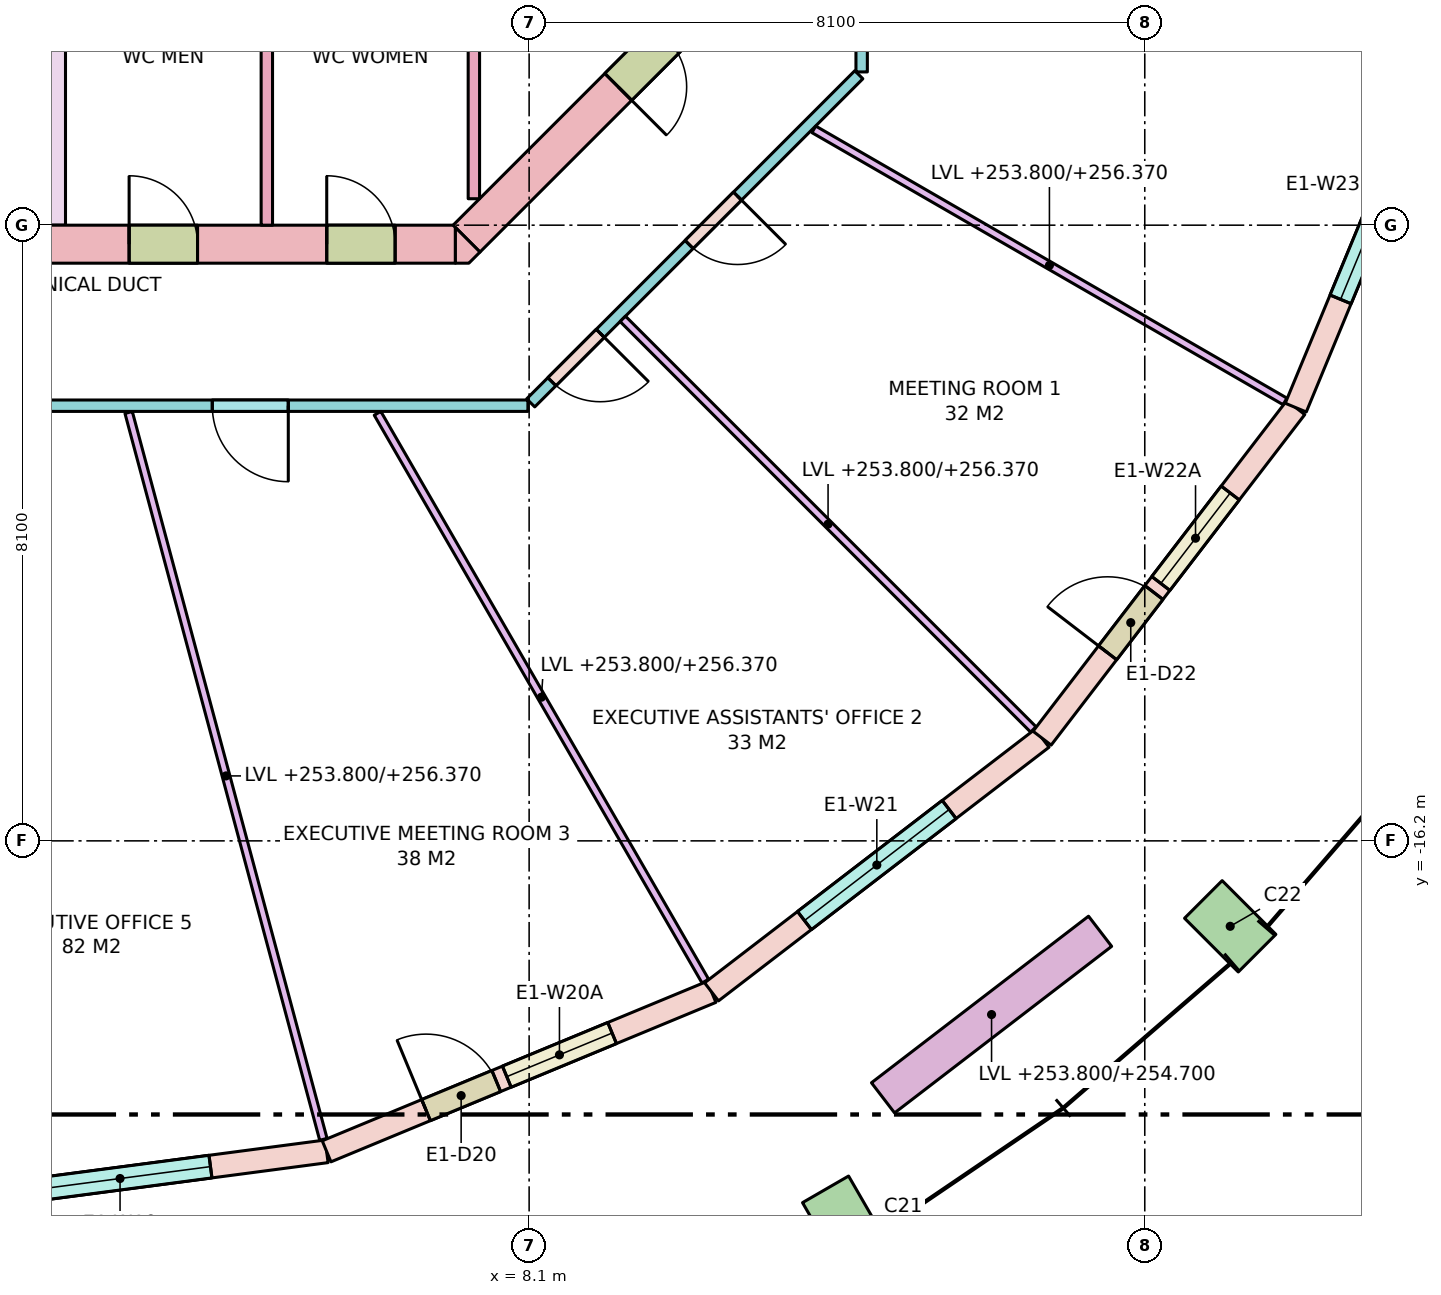
"""IFC4 building model, lengths in metres.
Left out: names, types, materials, properties, quantities, classifications, styles, units other than length and angle.
Written with IfcOpenShell. Run it as: python <this file> out.ifc"""

import sys

from ifc_helpers import new_model, si_unit, direction, frame, frame_2d, origin, origin_2d, place, context, subcontext, project, spatial, polyline, rectangle, outline, extrude, element, fill, save


model = new_model("IFC4")
c1 = context("Model", 3, precision=1e-05, world=origin(), true_north=direction((0.0, 1.0)))
c2 = subcontext(c1, "Body", "Model", "MODEL_VIEW")
j1 = project(units=[si_unit("LENGTHUNIT", "METRE"), si_unit("PLANEANGLEUNIT", "RADIAN")], contexts=[c1])
p1 = place(None, origin())
s1 = spatial("IfcSite", under=j1, at=p1, CompositionType="ELEMENT")
p2 = place(p1, origin())
s2 = spatial("IfcBuilding", under=s1, at=p2, CompositionType="ELEMENT")
p3 = place(p2, frame((0.0, 0.0, 253.8)))
s3 = spatial("IfcBuildingStorey", under=s2, at=p3, CompositionType="ELEMENT", Elevation=253.8)
for number, where, z_axis, x_axis in (
    (1, (12.25, -21.218, 0.0), (0.0, 0.0, 1.0), (0.866, 0.5, 0.0)),
    (2, (17.324, -17.324, 0.0), (0.0, 0.0, 1.0), (0.707, 0.707, 0.0)),
):
    element("IfcColumn", number, at=place(p3, frame(where, z_axis=z_axis, x_axis=x_axis)), inside=s3, PredefinedType="COLUMN", context=c2, shape_type="SweptSolid", body=[
        extrude(rectangle(XDim=0.7, YDim=1.0, at=origin_2d()), origin(), (0.0, 0.0, 1.0), 3.7),
    ])
p4 = place(p3, frame((-7.13, -8.35, -0.28), z_axis=(0.0, 0.0, 1.0), x_axis=(1.0, 0.0, 0.0)))
e3 = element("IfcWall", 3, at=p4, inside=s3, PredefinedType="SHEAR", context=c2, shape_type="SweptSolid", body=[
    extrude(rectangle(XDim=14.26, YDim=0.5, at=frame_2d((7.13, 0.0))), origin(), (0.0, 0.0, 1.0), 3.7),
])
p5 = place(p4, frame((8.08, 0.0, 0.28)))
e4 = element("IfcOpeningElement", 4, at=p5, cuts=e3, PredefinedType="OPENING", context=c2, shape_type="SweptSolid", body=[
    extrude(rectangle(XDim=0.7, YDim=2.1, at=frame_2d((0.35, 1.05))), frame((0.0, 0.26, 0.0), z_axis=(0.0, -1.0, 0.0), x_axis=(1.0, 0.0, 0.0)), (0.0, 0.0, 1.0), 0.52),
])
p6 = place(p4, frame((6.205, 0.0, 0.28)))
e5 = element("IfcOpeningElement", 5, at=p6, cuts=e3, PredefinedType="OPENING", context=c2, shape_type="SweptSolid", body=[
    extrude(rectangle(XDim=0.9, YDim=2.1, at=frame_2d((0.45, 1.05))), frame((0.0, 0.26, 0.0), z_axis=(0.0, -1.0, 0.0), x_axis=(1.0, 0.0, 0.0)), (0.0, 0.0, 1.0), 0.52),
])
p7 = place(p4, frame((9.967, 0.0, 0.28)))
e6 = element("IfcOpeningElement", 6, at=p7, cuts=e3, PredefinedType="OPENING", context=c2, shape_type="SweptSolid", body=[
    extrude(rectangle(XDim=0.9, YDim=2.1, at=frame_2d((0.45, 1.05))), frame((0.0, 0.26, 0.0), z_axis=(0.0, -1.0, 0.0), x_axis=(1.0, 0.0, 0.0)), (0.0, 0.0, 1.0), 0.52),
])
p8 = place(p4, frame((12.567, 0.0, 0.28)))
e7 = element("IfcOpeningElement", 7, at=p8, cuts=e3, PredefinedType="OPENING", context=c2, shape_type="SweptSolid", body=[
    extrude(rectangle(XDim=0.9, YDim=2.1, at=frame_2d((0.45, 1.05))), frame((0.0, 0.26, 0.0), z_axis=(0.0, -1.0, 0.0), x_axis=(1.0, 0.0, 0.0)), (0.0, 0.0, 1.0), 0.52),
])
p9 = place(p3, frame((10.277, -5.277, -0.28), z_axis=(0.0, 0.0, 1.0), x_axis=(-0.707106781187, -0.707106781187, 0.0)))
e8 = element("IfcWall", 8, at=p9, inside=s3, PredefinedType="SHEAR", context=c2, shape_type="SweptSolid", body=[
    extrude(rectangle(XDim=4.243, YDim=0.5, at=frame_2d((2.121, 0.0))), origin(), (0.0, 0.0, 1.0), 3.7),
])
p10 = place(p9, frame((0.52, 0.0, 0.28)))
e9 = element("IfcOpeningElement", 9, at=p10, cuts=e8, PredefinedType="OPENING", context=c2, shape_type="SweptSolid", body=[
    extrude(rectangle(XDim=0.9, YDim=2.1, at=frame_2d((0.45, 1.05))), frame((0.0, 0.26, 0.0), z_axis=(0.0, -1.0, 0.0), x_axis=(1.0, 0.0, 0.0)), (0.0, 0.0, 1.0), 0.52),
])
p11 = place(p3, frame((0.0, 0.0, -0.28)))
e10 = element("IfcWall", 10, at=p11, inside=s3, PredefinedType="SHEAR", context=c2, shape_type="SweptSolid", body=[
    extrude(outline(polyline([(7.307, -8.6), (7.13, -8.6), (7.13, -8.13), (7.454, -8.454), (7.307, -8.6)])), origin(), (0.0, 0.0, 1.0), 3.7),
])
p12 = place(p3, frame((1.85, -8.1, 0.0), z_axis=(0.0, 0.0, 1.0), x_axis=(0.0, 1.0, 0.0)))
e11 = element("IfcWall", 11, at=p12, inside=s3, PredefinedType="SHEAR", context=c2, shape_type="SweptSolid", body=[
    extrude(rectangle(XDim=6.6, YDim=0.3, at=frame_2d((3.3, 0.0))), origin(), (0.0, 0.0, 1.0), 3.42),
])
p13 = place(p3, frame((0.0, -21.0, 0.0), z_axis=(0.0, 0.0, 1.0), x_axis=(0.991444743541, 0.130527087244, 0.0)))
e12 = element("IfcWall", 12, at=p13, inside=s3, PredefinedType="STANDARD", context=c2, shape_type="SweptSolid", body=[
    extrude(rectangle(XDim=5.482, YDim=0.3, at=frame_2d((2.741, 0.0))), origin(), (0.0, 0.0, 1.0), 3.42),
])
p14 = place(p13, frame((1.541, 0.0, 0.8)))
e13 = element("IfcOpeningElement", 13, at=p14, cuts=e12, PredefinedType="OPENING", context=c2, shape_type="SweptSolid", body=[
    extrude(rectangle(XDim=2.4, YDim=2.4, at=frame_2d((1.2, 1.2))), frame((0.0, 0.16, 0.0), z_axis=(0.0, -1.0, 0.0), x_axis=(1.0, 0.0, 0.0)), (0.0, 0.0, 1.0), 0.32),
])
p15 = place(p3, frame((5.435, -20.284, 0.0), z_axis=(0.0, 0.0, 1.0), x_axis=(0.923877333662, 0.382688740813, 0.0)))
e14 = element("IfcWall", 14, at=p15, inside=s3, PredefinedType="STANDARD", context=c2, shape_type="SweptSolid", body=[
    extrude(rectangle(XDim=5.482, YDim=0.3, at=frame_2d((2.741, 0.0))), origin(), (0.0, 0.0, 1.0), 3.42),
])
p16 = place(p15, frame((1.416, 0.0, 0.0)))
e15 = element("IfcOpeningElement", 15, at=p16, cuts=e14, PredefinedType="OPENING", context=c2, shape_type="SweptSolid", body=[
    extrude(rectangle(XDim=1.0, YDim=2.4, at=frame_2d((0.5, 1.2))), frame((0.0, 0.16, 0.0), z_axis=(0.0, -1.0, 0.0), x_axis=(1.0, 0.0, 0.0)), (0.0, 0.0, 1.0), 0.32),
])
p17 = place(p15, frame((2.566, 0.0, 0.8)))
e16 = element("IfcOpeningElement", 16, at=p17, cuts=e14, PredefinedType="OPENING", context=c2, shape_type="SweptSolid", body=[
    extrude(rectangle(XDim=1.5, YDim=2.4, at=frame_2d((0.75, 1.2))), frame((0.0, 0.16, 0.0), z_axis=(0.0, -1.0, 0.0), x_axis=(1.0, 0.0, 0.0)), (0.0, 0.0, 1.0), 0.32),
])
p18 = place(p3, frame((10.5, -18.187, 0.0), z_axis=(0.0, 0.0, 1.0), x_axis=(0.793335336593, 0.608784891166, 0.0)))
e17 = element("IfcWall", 17, at=p18, inside=s3, PredefinedType="STANDARD", context=c2, shape_type="SweptSolid", body=[
    extrude(rectangle(XDim=5.482, YDim=0.3, at=frame_2d((2.741, 0.0))), origin(), (0.0, 0.0, 1.0), 3.42),
])
p19 = place(p18, frame((1.541, 0.0, 0.8)))
e18 = element("IfcOpeningElement", 18, at=p19, cuts=e17, PredefinedType="OPENING", context=c2, shape_type="SweptSolid", body=[
    extrude(rectangle(XDim=2.4, YDim=2.4, at=frame_2d((1.2, 1.2))), frame((0.0, 0.16, 0.0), z_axis=(0.0, -1.0, 0.0), x_axis=(1.0, 0.0, 0.0)), (0.0, 0.0, 1.0), 0.32),
])
p20 = place(p3, frame((14.849, -14.849, 0.0), z_axis=(0.0, 0.0, 1.0), x_axis=(0.608784891166, 0.793335336593, 0.0)))
e19 = element("IfcWall", 19, at=p20, inside=s3, PredefinedType="STANDARD", context=c2, shape_type="SweptSolid", body=[
    extrude(rectangle(XDim=5.482, YDim=0.3, at=frame_2d((2.741, 0.0))), origin(), (0.0, 0.0, 1.0), 3.42),
])
p21 = place(p20, frame((1.416, 0.0, 0.0)))
e20 = element("IfcOpeningElement", 20, at=p21, cuts=e19, PredefinedType="OPENING", context=c2, shape_type="SweptSolid", body=[
    extrude(rectangle(XDim=1.0, YDim=2.4, at=frame_2d((0.5, 1.2))), frame((0.0, 0.16, 0.0), z_axis=(0.0, -1.0, 0.0), x_axis=(1.0, 0.0, 0.0)), (0.0, 0.0, 1.0), 0.32),
])
p22 = place(p20, frame((2.566, 0.0, 0.8)))
e21 = element("IfcOpeningElement", 21, at=p22, cuts=e19, PredefinedType="OPENING", context=c2, shape_type="SweptSolid", body=[
    extrude(rectangle(XDim=1.5, YDim=2.4, at=frame_2d((0.75, 1.2))), frame((0.0, 0.16, 0.0), z_axis=(0.0, -1.0, 0.0), x_axis=(1.0, 0.0, 0.0)), (0.0, 0.0, 1.0), 0.32),
])
p23 = place(p3, frame((18.187, -10.5, 0.0), z_axis=(0.0, 0.0, 1.0), x_axis=(0.382688740813, 0.923877333662, 0.0)))
e22 = element("IfcWall", 22, at=p23, inside=s3, PredefinedType="STANDARD", context=c2, shape_type="SweptSolid", body=[
    extrude(rectangle(XDim=5.482, YDim=0.3, at=frame_2d((2.741, 0.0))), origin(), (0.0, 0.0, 1.0), 3.42),
])
p24 = place(p23, frame((1.541, 0.0, 0.8)))
e23 = element("IfcOpeningElement", 23, at=p24, cuts=e22, PredefinedType="OPENING", context=c2, shape_type="SweptSolid", body=[
    extrude(rectangle(XDim=2.4, YDim=2.4, at=frame_2d((1.2, 1.2))), frame((0.0, 0.16, 0.0), z_axis=(0.0, -1.0, 0.0), x_axis=(1.0, 0.0, 0.0)), (0.0, 0.0, 1.0), 0.32),
])
p25 = place(p3, frame((12.756, -19.581, 0.0), z_axis=(0.0, 0.0, 1.0), x_axis=(0.793384730612, 0.608720518162, 0.0)))
e24 = element("IfcWall", 24, at=p25, inside=s3, PredefinedType="PARAPET", context=c2, shape_type="SweptSolid", body=[
    extrude(rectangle(XDim=3.6, YDim=0.5, at=frame_2d((1.8, 0.0))), origin(), (0.0, 0.0, 1.0), 0.9),
])
p26 = place(p3, frame((4.649, -8.1, 0.0), z_axis=(0.0, 0.0, 1.0), x_axis=(0.0, 1.0, 0.0)))
e25 = element("IfcWall", 25, at=p26, inside=s3, PredefinedType="PARTITIONING", context=c2, shape_type="SweptSolid", body=[
    extrude(rectangle(XDim=3.6, YDim=0.15, at=frame_2d((1.8, 0.0))), origin(), (0.0, 0.0, 1.0), 3.42),
])
p27 = place(p3, frame((7.373, -7.752, 0.0), z_axis=(0.0, 0.0, 1.0), x_axis=(0.0, 1.0, 0.0)))
e26 = element("IfcWall", 26, at=p27, inside=s3, PredefinedType="PARTITIONING", context=c2, shape_type="SweptSolid", body=[
    extrude(rectangle(XDim=3.252, YDim=0.15, at=frame_2d((1.626, 0.0))), origin(), (0.0, 0.0, 1.0), 3.42),
])
p28 = place(p3, frame((12.438, -6.121, 0.0), z_axis=(0.0, 0.0, 1.0), x_axis=(-0.707106781187, -0.707106781187, 0.0)))
e27 = element("IfcWall", 27, at=p28, inside=s3, PredefinedType="PARTITIONING", context=c2, shape_type="SweptSolid", body=[
    extrude(rectangle(XDim=6.105, YDim=0.15, at=frame_2d((3.053, 0.0))), origin(), (0.0, 0.0, 1.0), 2.57),
])
p29 = place(p28, frame((4.811, 0.0, 0.0)))
e28 = element("IfcOpeningElement", 28, at=p29, cuts=e27, PredefinedType="OPENING", context=c2, shape_type="SweptSolid", body=[
    extrude(rectangle(XDim=0.9, YDim=2.1, at=frame_2d((0.45, 1.05))), frame((0.0, 0.085, 0.0), z_axis=(0.0, -1.0, 0.0), x_axis=(1.0, 0.0, 0.0)), (0.0, 0.0, 1.0), 0.17),
])
p30 = place(p28, frame((2.258, 0.0, 0.0)))
e29 = element("IfcOpeningElement", 29, at=p30, cuts=e27, PredefinedType="OPENING", context=c2, shape_type="SweptSolid", body=[
    extrude(rectangle(XDim=0.9, YDim=2.1, at=frame_2d((0.45, 1.05))), frame((0.0, 0.085, 0.0), z_axis=(0.0, -1.0, 0.0), x_axis=(1.0, 0.0, 0.0)), (0.0, 0.0, 1.0), 0.17),
])
p31 = place(p3, frame((8.084, -10.475, 0.0), z_axis=(0.0, 0.0, 1.0), x_axis=(-1.0, 0.0, 0.0)))
e30 = element("IfcWall", 30, at=p31, inside=s3, PredefinedType="PARTITIONING", context=c2, shape_type="SweptSolid", body=[
    extrude(rectangle(XDim=16.167, YDim=0.15, at=frame_2d((8.084, 0.0))), origin(), (0.0, 0.0, 1.0), 2.57),
])
p32 = place(p31, frame((12.065, 0.0, 0.0)))
e31 = element("IfcOpeningElement", 31, at=p32, cuts=e30, PredefinedType="OPENING", context=c2, shape_type="SweptSolid", body=[
    extrude(rectangle(XDim=0.9, YDim=2.1, at=frame_2d((0.45, 1.05))), frame((0.0, 0.085, 0.0), z_axis=(0.0, -1.0, 0.0), x_axis=(1.0, 0.0, 0.0)), (0.0, 0.0, 1.0), 0.17),
])
p33 = place(p31, frame((7.584, 0.0, 0.0)))
e32 = element("IfcOpeningElement", 32, at=p33, cuts=e30, PredefinedType="OPENING", context=c2, shape_type="SweptSolid", body=[
    extrude(rectangle(XDim=1.0, YDim=2.1, at=frame_2d((0.5, 1.05))), frame((0.0, 0.085, 0.0), z_axis=(0.0, -1.0, 0.0), x_axis=(1.0, 0.0, 0.0)), (0.0, 0.0, 1.0), 0.17),
])
p34 = place(p31, frame((3.153, 0.0, 0.0)))
e33 = element("IfcOpeningElement", 33, at=p34, cuts=e30, PredefinedType="OPENING", context=c2, shape_type="SweptSolid", body=[
    extrude(rectangle(XDim=1.0, YDim=2.1, at=frame_2d((0.5, 1.05))), frame((0.0, 0.085, 0.0), z_axis=(0.0, -1.0, 0.0), x_axis=(1.0, 0.0, 0.0)), (0.0, 0.0, 1.0), 0.17),
])
p35 = place(p3, frame((12.475, 6.084, 0.0), z_axis=(0.0, 0.0, 1.0), x_axis=(0.0, -1.0, 0.0)))
e34 = element("IfcWall", 34, at=p35, inside=s3, PredefinedType="PARTITIONING", context=c2, shape_type="SweptSolid", body=[
    extrude(rectangle(XDim=12.167, YDim=0.15, at=frame_2d((6.084, 0.0))), origin(), (0.0, 0.0, 1.0), 2.57),
])
p36 = place(p35, frame((8.601, 0.0, 0.0)))
e35 = element("IfcOpeningElement", 35, at=p36, cuts=e34, PredefinedType="OPENING", context=c2, shape_type="SweptSolid", body=[
    extrude(rectangle(XDim=1.0, YDim=2.1, at=frame_2d((0.5, 1.05))), frame((0.0, 0.085, 0.0), z_axis=(0.0, -1.0, 0.0), x_axis=(1.0, 0.0, 0.0)), (0.0, 0.0, 1.0), 0.17),
])
p37 = place(p35, frame((2.567, 0.0, 0.0)))
e36 = element("IfcOpeningElement", 36, at=p37, cuts=e34, PredefinedType="OPENING", context=c2, shape_type="SweptSolid", body=[
    extrude(rectangle(XDim=1.0, YDim=2.1, at=frame_2d((0.5, 1.05))), frame((0.0, 0.085, 0.0), z_axis=(0.0, -1.0, 0.0), x_axis=(1.0, 0.0, 0.0)), (0.0, 0.0, 1.0), 0.17),
])
p38 = place(p3, frame((2.831, -10.564, 0.0), z_axis=(0.0, 0.0, 1.0), x_axis=(0.258795254151, -0.965932200741, 0.0)))
e37 = element("IfcWall", 37, at=p38, inside=s3, PredefinedType="PARTITIONING", context=c2, shape_type="SweptSolid", body=[
    extrude(rectangle(XDim=9.9, YDim=0.1, at=frame_2d((4.95, 0.0))), origin(), (0.0, 0.0, 1.0), 2.57),
])
p39 = place(p3, frame((6.105, -10.575, 0.0), z_axis=(0.0, 0.0, 1.0), x_axis=(0.50001399067, -0.866017326117, 0.0)))
e38 = element("IfcWall", 38, at=p39, inside=s3, PredefinedType="PARTITIONING", context=c2, shape_type="SweptSolid", body=[
    extrude(rectangle(XDim=8.626, YDim=0.1, at=frame_2d((4.313, 0.0))), origin(), (0.0, 0.0, 1.0), 2.57),
])
p40 = place(p3, frame((9.333, -9.333, 0.0), z_axis=(0.0, 0.0, 1.0), x_axis=(0.707106781187, -0.707106781187, 0.0)))
e39 = element("IfcWall", 39, at=p40, inside=s3, PredefinedType="PARTITIONING", context=c2, shape_type="SweptSolid", body=[
    extrude(rectangle(XDim=7.639, YDim=0.1, at=frame_2d((3.819, 0.0))), origin(), (0.0, 0.0, 1.0), 2.57),
])
p41 = place(p3, frame((11.846, -6.839, 0.0), z_axis=(0.0, 0.0, 1.0), x_axis=(0.866011787705, -0.500023583, 0.0)))
e40 = element("IfcWall", 40, at=p41, inside=s3, PredefinedType="PARTITIONING", context=c2, shape_type="SweptSolid", body=[
    extrude(rectangle(XDim=7.158, YDim=0.1, at=frame_2d((3.579, 0.0))), origin(), (0.0, 0.0, 1.0), 2.57),
])
p42 = place(p14, origin())
e41 = element("IfcWindow", 41, at=p42, inside=s3, PartitioningType="SINGLE_PANEL", PredefinedType="WINDOW", context=c2, shape_type="SweptSolid", body=[
    extrude(rectangle(XDim=2.4, YDim=2.4, at=frame_2d((1.2, 1.2))), frame((0.0, 0.03, 0.0), z_axis=(0.0, -1.0, 0.0), x_axis=(1.0, 0.0, 0.0)), (0.0, 0.0, 1.0), 0.06),
])
fill(e13, e41)
p43 = place(p16, origin())
e42 = element("IfcDoor", 42, at=p43, inside=s3, OperationType="SINGLE_SWING_LEFT", PredefinedType="DOOR", context=c2, shape_type="SweptSolid", body=[
    extrude(rectangle(XDim=1.0, YDim=2.4, at=frame_2d((0.5, 1.2))), frame((0.0, 0.025, 0.0), z_axis=(0.0, -1.0, 0.0), x_axis=(1.0, 0.0, 0.0)), (0.0, 0.0, 1.0), 0.05),
])
fill(e15, e42)
p44 = place(p17, origin())
e43 = element("IfcWindow", 43, at=p44, inside=s3, PartitioningType="SINGLE_PANEL", PredefinedType="WINDOW", context=c2, shape_type="SweptSolid", body=[
    extrude(rectangle(XDim=1.5, YDim=2.4, at=frame_2d((0.75, 1.2))), frame((0.0, 0.03, 0.0), z_axis=(0.0, -1.0, 0.0), x_axis=(1.0, 0.0, 0.0)), (0.0, 0.0, 1.0), 0.06),
])
fill(e16, e43)
p45 = place(p19, origin())
e44 = element("IfcWindow", 44, at=p45, inside=s3, PartitioningType="SINGLE_PANEL", PredefinedType="WINDOW", context=c2, shape_type="SweptSolid", body=[
    extrude(rectangle(XDim=2.4, YDim=2.4, at=frame_2d((1.2, 1.2))), frame((0.0, 0.03, 0.0), z_axis=(0.0, -1.0, 0.0), x_axis=(1.0, 0.0, 0.0)), (0.0, 0.0, 1.0), 0.06),
])
fill(e18, e44)
p46 = place(p21, origin())
e45 = element("IfcDoor", 45, at=p46, inside=s3, OperationType="SINGLE_SWING_LEFT", PredefinedType="DOOR", context=c2, shape_type="SweptSolid", body=[
    extrude(rectangle(XDim=1.0, YDim=2.4, at=frame_2d((0.5, 1.2))), frame((0.0, 0.025, 0.0), z_axis=(0.0, -1.0, 0.0), x_axis=(1.0, 0.0, 0.0)), (0.0, 0.0, 1.0), 0.05),
])
fill(e20, e45)
p47 = place(p22, origin())
e46 = element("IfcWindow", 46, at=p47, inside=s3, PartitioningType="SINGLE_PANEL", PredefinedType="WINDOW", context=c2, shape_type="SweptSolid", body=[
    extrude(rectangle(XDim=1.5, YDim=2.4, at=frame_2d((0.75, 1.2))), frame((0.0, 0.03, 0.0), z_axis=(0.0, -1.0, 0.0), x_axis=(1.0, 0.0, 0.0)), (0.0, 0.0, 1.0), 0.06),
])
fill(e21, e46)
p48 = place(p24, origin())
e47 = element("IfcWindow", 47, at=p48, inside=s3, PartitioningType="SINGLE_PANEL", PredefinedType="WINDOW", context=c2, shape_type="SweptSolid", body=[
    extrude(rectangle(XDim=2.4, YDim=2.4, at=frame_2d((1.2, 1.2))), frame((0.0, 0.03, 0.0), z_axis=(0.0, -1.0, 0.0), x_axis=(1.0, 0.0, 0.0)), (0.0, 0.0, 1.0), 0.06),
])
fill(e23, e47)
p49 = place(p7, origin())
e48 = element("IfcDoor", 48, at=p49, inside=s3, OperationType="SINGLE_SWING_LEFT", PredefinedType="DOOR", context=c2, shape_type="SweptSolid", body=[
    extrude(rectangle(XDim=0.9, YDim=2.1, at=frame_2d((0.45, 1.05))), frame((0.0, 0.025, 0.0), z_axis=(0.0, -1.0, 0.0), x_axis=(1.0, 0.0, 0.0)), (0.0, 0.0, 1.0), 0.05),
])
fill(e6, e48)
p50 = place(p8, origin())
e49 = element("IfcDoor", 49, at=p50, inside=s3, OperationType="SINGLE_SWING_LEFT", PredefinedType="DOOR", context=c2, shape_type="SweptSolid", body=[
    extrude(rectangle(XDim=0.9, YDim=2.1, at=frame_2d((0.45, 1.05))), frame((0.0, 0.025, 0.0), z_axis=(0.0, -1.0, 0.0), x_axis=(1.0, 0.0, 0.0)), (0.0, 0.0, 1.0), 0.05),
])
fill(e7, e49)
p51 = place(p10, origin())
e50 = element("IfcDoor", 50, at=p51, inside=s3, OperationType="SINGLE_SWING_RIGHT", PredefinedType="DOOR", context=c2, shape_type="SweptSolid", body=[
    extrude(rectangle(XDim=0.9, YDim=2.1, at=frame_2d((0.45, 1.05))), frame((0.0, 0.025, 0.0), z_axis=(0.0, -1.0, 0.0), x_axis=(1.0, 0.0, 0.0)), (0.0, 0.0, 1.0), 0.05),
])
fill(e9, e50)
p52 = place(p34, origin())
e51 = element("IfcDoor", 51, at=p52, inside=s3, OperationType="SINGLE_SWING_LEFT", PredefinedType="DOOR", context=c2, shape_type="SweptSolid", body=[
    extrude(rectangle(XDim=1.0, YDim=2.1, at=frame_2d((0.5, 1.05))), frame((0.0, 0.025, 0.0), z_axis=(0.0, -1.0, 0.0), x_axis=(1.0, 0.0, 0.0)), (0.0, 0.0, 1.0), 0.05),
])
fill(e33, e51)
p53 = place(p29, origin())
e52 = element("IfcDoor", 52, at=p53, inside=s3, OperationType="SINGLE_SWING_LEFT", PredefinedType="DOOR", context=c2, shape_type="SweptSolid", body=[
    extrude(rectangle(XDim=0.9, YDim=2.1, at=frame_2d((0.45, 1.05))), frame((0.0, 0.025, 0.0), z_axis=(0.0, -1.0, 0.0), x_axis=(1.0, 0.0, 0.0)), (0.0, 0.0, 1.0), 0.05),
])
fill(e28, e52)
p54 = place(p30, origin())
e53 = element("IfcDoor", 53, at=p54, inside=s3, OperationType="SINGLE_SWING_LEFT", PredefinedType="DOOR", context=c2, shape_type="SweptSolid", body=[
    extrude(rectangle(XDim=0.9, YDim=2.1, at=frame_2d((0.45, 1.05))), frame((0.0, 0.025, 0.0), z_axis=(0.0, -1.0, 0.0), x_axis=(1.0, 0.0, 0.0)), (0.0, 0.0, 1.0), 0.05),
])
fill(e29, e53)
save(model, sys.argv[1])
